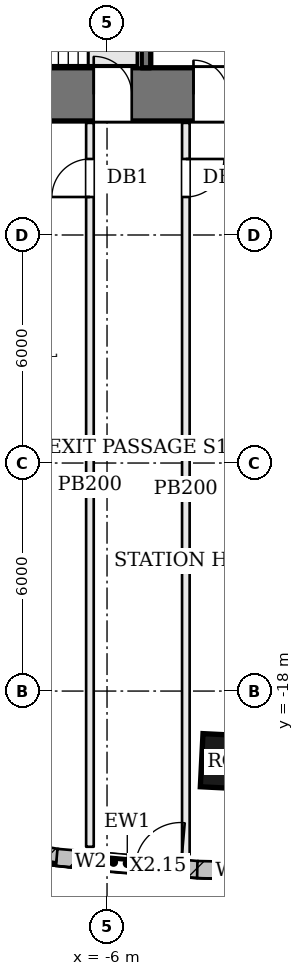
"""IFC4 building model, lengths in metres.
Left out: names, types, materials, properties, quantities, classifications, styles, units other than length and angle.
Written with IfcOpenShell. Run it as: python <this file> out.ifc"""

import sys

from ifc_helpers import new_model, si_unit, direction, frame, frame_2d, origin, origin_2d, place, context, subcontext, project, spatial, rectangle, extrude, element, fill, save


model = new_model("IFC4")
c1 = context("Model", 3, precision=1e-05, world=origin(), true_north=direction((0.0, 1.0)))
c2 = subcontext(c1, "Body", "Model", "MODEL_VIEW")
j1 = project(units=[si_unit("LENGTHUNIT", "METRE"), si_unit("PLANEANGLEUNIT", "RADIAN")], contexts=[c1])
p1 = place(None, origin())
s1 = spatial("IfcSite", under=j1, at=p1, CompositionType="ELEMENT")
p2 = place(p1, origin())
s2 = spatial("IfcBuilding", under=s1, at=p2, CompositionType="ELEMENT")
p3 = place(p2, origin())
s3 = spatial("IfcBuildingStorey", under=s2, at=p3, CompositionType="ELEMENT", Elevation=0.0)
p4 = place(p3, frame((-13.0, -2.3, 0.0), z_axis=(0.0, 0.0, 1.0), x_axis=(1.0, 0.0, 0.0)))
e1 = element("IfcWall", 1, at=p4, inside=s3, PredefinedType="SHEAR", context=c2, shape_type="SweptSolid", body=[
    extrude(rectangle(XDim=26.0, YDim=1.4, at=frame_2d((13.0, 0.0))), origin(), (0.0, 0.0, 1.0), 7.2),
])
p5 = place(p4, frame((9.275, 0.0, 0.0)))
e2 = element("IfcOpeningElement", 2, at=p5, cuts=e1, PredefinedType="OPENING", context=c2, shape_type="SweptSolid", body=[
    extrude(rectangle(XDim=0.9, YDim=2.1, at=frame_2d((0.45, 1.05))), frame((0.0, 0.71, 0.0), z_axis=(0.0, -1.0, 0.0), x_axis=(1.0, 0.0, 0.0)), (0.0, 0.0, 1.0), 1.42),
])
p6 = place(p4, frame((12.525, 0.0, 0.0)))
e3 = element("IfcOpeningElement", 3, at=p6, cuts=e1, PredefinedType="OPENING", context=c2, shape_type="SweptSolid", body=[
    extrude(rectangle(XDim=0.9, YDim=2.1, at=frame_2d((0.45, 1.05))), frame((0.0, 0.71, 0.0), z_axis=(0.0, -1.0, 0.0), x_axis=(1.0, 0.0, 0.0)), (0.0, 0.0, 1.0), 1.42),
])
p7 = place(p4, frame((15.0, 0.0, 0.0)))
e4 = element("IfcOpeningElement", 4, at=p7, cuts=e1, PredefinedType="OPENING", context=c2, shape_type="SweptSolid", body=[
    extrude(rectangle(XDim=1.0, YDim=2.1, at=frame_2d((0.5, 1.05))), frame((0.0, 0.71, 0.0), z_axis=(0.0, -1.0, 0.0), x_axis=(1.0, 0.0, 0.0)), (0.0, 0.0, 1.0), 1.42),
])
p8 = place(p4, frame((16.7, 0.0, 0.0)))
e5 = element("IfcOpeningElement", 5, at=p8, cuts=e1, PredefinedType="OPENING", context=c2, shape_type="SweptSolid", body=[
    extrude(rectangle(XDim=0.9, YDim=2.1, at=frame_2d((0.45, 1.05))), frame((0.0, 0.71, 0.0), z_axis=(0.0, -1.0, 0.0), x_axis=(1.0, 0.0, 0.0)), (0.0, 0.0, 1.0), 1.42),
])
p9 = place(p4, frame((6.65, 0.0, 0.0)))
e6 = element("IfcOpeningElement", 6, at=p9, cuts=e1, PredefinedType="OPENING", context=c2, shape_type="SweptSolid", body=[
    extrude(rectangle(XDim=1.0, YDim=2.1, at=frame_2d((0.5, 1.05))), frame((0.0, 0.71, 0.0), z_axis=(0.0, -1.0, 0.0), x_axis=(1.0, 0.0, 0.0)), (0.0, 0.0, 1.0), 1.42),
])
p10 = place(p4, frame((18.35, 0.0, 0.0)))
e7 = element("IfcOpeningElement", 7, at=p10, cuts=e1, PredefinedType="OPENING", context=c2, shape_type="SweptSolid", body=[
    extrude(rectangle(XDim=1.0, YDim=2.1, at=frame_2d((0.5, 1.05))), frame((0.0, 0.71, 0.0), z_axis=(0.0, -1.0, 0.0), x_axis=(1.0, 0.0, 0.0)), (0.0, 0.0, 1.0), 1.42),
])
p11 = place(p3, frame((-2.811, -19.854, 0.0), z_axis=(0.0, 0.0, 1.0), x_axis=(0.99874501614, -0.050083857035, 0.0)))
e8 = element("IfcColumn", 8, at=p11, inside=s3, PredefinedType="COLUMN", context=c2, shape_type="SweptSolid", body=[
    extrude(rectangle(XDim=1.4, YDim=1.4, at=origin_2d()), origin(), (0.0, 0.0, 1.0), 7.2),
])
p12 = place(p3, frame((-11.134, -21.706, 0.0), z_axis=(0.0, 0.0, 1.0), x_axis=(0.984947461591, -0.172853978566, 0.0)))
e9 = element("IfcWall", 9, at=p12, inside=s3, PredefinedType="SOLIDWALL", context=c2, shape_type="SweptSolid", body=[
    extrude(rectangle(XDim=3.888, YDim=0.45, at=frame_2d((1.944, 0.0))), origin(), (0.0, 0.0, 1.0), 3.55),
])
p13 = place(p12, frame((0.744, 0.0, 0.0)))
e10 = element("IfcOpeningElement", 10, at=p13, cuts=e9, PredefinedType="OPENING", context=c2, shape_type="SweptSolid", body=[
    extrude(rectangle(XDim=2.4, YDim=3.2, at=frame_2d((1.2, 1.6))), frame((0.0, 0.235, 0.0), z_axis=(0.0, -1.0, 0.0), x_axis=(1.0, 0.0, 0.0)), (0.0, 0.0, 1.0), 0.47),
])
p14 = place(p3, frame((-7.323, -22.376, 0.0), z_axis=(0.0, 0.0, 1.0), x_axis=(0.996259982326, -0.086406293838, 0.0)))
e11 = element("IfcWall", 11, at=p14, inside=s3, PredefinedType="SOLIDWALL", context=c2, shape_type="SweptSolid", body=[
    extrude(rectangle(XDim=3.727, YDim=0.45, at=frame_2d((1.863, 0.0))), origin(), (0.0, 0.0, 1.0), 6.95),
])
p15 = place(p14, frame((0.45, 0.0, 0.9)))
e12 = element("IfcOpeningElement", 12, at=p15, cuts=e11, PredefinedType="OPENING", context=c2, shape_type="SweptSolid", body=[
    extrude(rectangle(XDim=2.1, YDim=5.0, at=frame_2d((1.05, 2.5))), frame((0.0, 0.235, 0.0), z_axis=(0.0, -1.0, 0.0), x_axis=(1.0, 0.0, 0.0)), (0.0, 0.0, 1.0), 0.47),
])
p16 = place(p14, frame((2.077, 0.0, 0.0)))
e13 = element("IfcOpeningElement", 13, at=p16, cuts=e11, PredefinedType="OPENING", context=c2, shape_type="SweptSolid", body=[
    extrude(rectangle(XDim=1.2, YDim=2.4, at=frame_2d((0.6, 1.2))), frame((0.0, 0.235, 0.0), z_axis=(0.0, -1.0, 0.0), x_axis=(1.0, 0.0, 0.0)), (0.0, 0.0, 1.0), 0.47),
])
p17 = place(p3, frame((-3.625, -22.697, 0.0), z_axis=(0.0, 0.0, 1.0), x_axis=(0.999769941673, -0.0214490962, 0.0)))
e14 = element("IfcWall", 14, at=p17, inside=s3, PredefinedType="SOLIDWALL", context=c2, shape_type="SweptSolid", body=[
    extrude(rectangle(XDim=3.631, YDim=0.45, at=frame_2d((1.815, 0.0))), origin(), (0.0, 0.0, 1.0), 6.95),
])
p18 = place(p17, frame((0.45, 0.0, 0.9)))
e15 = element("IfcOpeningElement", 15, at=p18, cuts=e14, PredefinedType="OPENING", context=c2, shape_type="SweptSolid", body=[
    extrude(rectangle(XDim=2.1, YDim=5.0, at=frame_2d((1.05, 2.5))), frame((0.0, 0.235, 0.0), z_axis=(0.0, -1.0, 0.0), x_axis=(1.0, 0.0, 0.0)), (0.0, 0.0, 1.0), 0.47),
])
p19 = place(p17, frame((1.681, 0.0, 0.0)))
e16 = element("IfcOpeningElement", 16, at=p19, cuts=e14, PredefinedType="OPENING", context=c2, shape_type="SweptSolid", body=[
    extrude(rectangle(XDim=1.5, YDim=2.4, at=frame_2d((0.75, 1.2))), frame((0.0, 0.235, 0.0), z_axis=(0.0, -1.0, 0.0), x_axis=(1.0, 0.0, 0.0)), (0.0, 0.0, 1.0), 0.47),
])
p20 = place(p3, frame((-4.975, -1.6, 0.0), z_axis=(0.0, 0.0, 1.0), x_axis=(0.0, 1.0, 0.0)))
e17 = element("IfcWall", 17, at=p20, inside=s3, PredefinedType="SOLIDWALL", context=c2, shape_type="SweptSolid", body=[
    extrude(rectangle(XDim=12.2, YDim=0.25, at=frame_2d((6.1, 0.0))), origin(), (0.0, 0.0, 1.0), 6.95),
])
p21 = place(p20, frame((4.65, 0.0, 0.0)))
e18 = element("IfcOpeningElement", 18, at=p21, cuts=e17, PredefinedType="OPENING", context=c2, shape_type="SweptSolid", body=[
    extrude(rectangle(XDim=1.2, YDim=2.1, at=frame_2d((0.6, 1.05))), frame((0.0, 0.135, 0.0), z_axis=(0.0, -1.0, 0.0), x_axis=(1.0, 0.0, 0.0)), (0.0, 0.0, 1.0), 0.27),
])
p22 = place(p3, frame((-3.926, -3.05, 0.0), z_axis=(0.0, 0.0, 1.0), x_axis=(0.0, -1.0, 0.0)))
e19 = element("IfcWall", 19, at=p22, inside=s3, PredefinedType="PARTITIONING", context=c2, shape_type="SweptSolid", body=[
    extrude(rectangle(XDim=19.252, YDim=0.2, at=frame_2d((9.626, 0.0))), origin(), (0.0, 0.0, 1.0), 6.23),
])
p23 = place(p22, frame((0.95, 0.0, 0.0)))
e20 = element("IfcOpeningElement", 20, at=p23, cuts=e19, PredefinedType="OPENING", context=c2, shape_type="SweptSolid", body=[
    extrude(rectangle(XDim=1.0, YDim=2.1, at=frame_2d((0.5, 1.05))), frame((0.0, 0.11, 0.0), z_axis=(0.0, -1.0, 0.0), x_axis=(1.0, 0.0, 0.0)), (0.0, 0.0, 1.0), 0.22),
])
p24 = place(p3, frame((-6.45, -22.097, 0.0), z_axis=(0.0, 0.0, 1.0), x_axis=(0.0, 1.0, 0.0)))
e21 = element("IfcWall", 21, at=p24, inside=s3, PredefinedType="PARTITIONING", context=c2, shape_type="SweptSolid", body=[
    extrude(rectangle(XDim=19.047, YDim=0.2, at=frame_2d((9.523, 0.0))), origin(), (0.0, 0.0, 1.0), 6.23),
])
p25 = place(p24, frame((17.097, 0.0, 0.0)))
e22 = element("IfcOpeningElement", 22, at=p25, cuts=e21, PredefinedType="OPENING", context=c2, shape_type="SweptSolid", body=[
    extrude(rectangle(XDim=1.0, YDim=2.1, at=frame_2d((0.5, 1.05))), frame((0.0, 0.11, 0.0), z_axis=(0.0, -1.0, 0.0), x_axis=(1.0, 0.0, 0.0)), (0.0, 0.0, 1.0), 0.22),
])
p26 = place(p15, origin())
e23 = element("IfcWindow", 23, at=p26, inside=s3, PartitioningType="SINGLE_PANEL", PredefinedType="WINDOW", context=c2, shape_type="SweptSolid", body=[
    extrude(rectangle(XDim=2.1, YDim=5.0, at=frame_2d((1.05, 2.5))), frame((0.0, 0.135, 0.0), z_axis=(0.0, -1.0, 0.0), x_axis=(1.0, 0.0, 0.0)), (0.0, 0.0, 1.0), 0.06),
])
fill(e12, e23)
p27 = place(p16, frame((1.2, 0.0, 0.0), z_axis=(0.0, 0.0, 1.0), x_axis=(-1.0, 0.0, 0.0)))
e24 = element("IfcDoor", 24, at=p27, inside=s3, OperationType="SINGLE_SWING_RIGHT", PredefinedType="DOOR", context=c2, shape_type="SweptSolid", body=[
    extrude(rectangle(XDim=1.2, YDim=2.4, at=frame_2d((0.6, 1.2))), frame((0.0, 0.025, 0.0), z_axis=(0.0, -1.0, 0.0), x_axis=(1.0, 0.0, 0.0)), (0.0, 0.0, 1.0), 0.05),
])
fill(e13, e24)
p28 = place(p18, origin())
e25 = element("IfcWindow", 25, at=p28, inside=s3, PartitioningType="SINGLE_PANEL", PredefinedType="WINDOW", context=c2, shape_type="SweptSolid", body=[
    extrude(rectangle(XDim=2.1, YDim=5.0, at=frame_2d((1.05, 2.5))), frame((0.0, 0.135, 0.0), z_axis=(0.0, -1.0, 0.0), x_axis=(1.0, 0.0, 0.0)), (0.0, 0.0, 1.0), 0.06),
])
fill(e15, e25)
p29 = place(p5, origin())
e26 = element("IfcDoor", 26, at=p29, inside=s3, OperationType="SINGLE_SWING_LEFT", PredefinedType="DOOR", context=c2, shape_type="SweptSolid", body=[
    extrude(rectangle(XDim=0.9, YDim=2.1, at=frame_2d((0.45, 1.05))), frame((0.0, 0.025, 0.0), z_axis=(0.0, -1.0, 0.0), x_axis=(1.0, 0.0, 0.0)), (0.0, 0.0, 1.0), 0.05),
])
fill(e2, e26)
p30 = place(p9, origin())
e27 = element("IfcDoor", 27, at=p30, inside=s3, OperationType="SINGLE_SWING_LEFT", PredefinedType="DOOR", context=c2, shape_type="SweptSolid", body=[
    extrude(rectangle(XDim=1.0, YDim=2.1, at=frame_2d((0.5, 1.05))), frame((0.0, 0.025, 0.0), z_axis=(0.0, -1.0, 0.0), x_axis=(1.0, 0.0, 0.0)), (0.0, 0.0, 1.0), 0.05),
])
fill(e6, e27)
p31 = place(p23, origin())
e28 = element("IfcDoor", 28, at=p31, inside=s3, OperationType="SINGLE_SWING_LEFT", PredefinedType="DOOR", context=c2, shape_type="SweptSolid", body=[
    extrude(rectangle(XDim=1.0, YDim=2.1, at=frame_2d((0.5, 1.05))), frame((0.0, 0.025, 0.0), z_axis=(0.0, -1.0, 0.0), x_axis=(1.0, 0.0, 0.0)), (0.0, 0.0, 1.0), 0.05),
])
fill(e20, e28)
p32 = place(p25, origin())
e29 = element("IfcDoor", 29, at=p32, inside=s3, OperationType="SINGLE_SWING_LEFT", PredefinedType="DOOR", context=c2, shape_type="SweptSolid", body=[
    extrude(rectangle(XDim=1.0, YDim=2.1, at=frame_2d((0.5, 1.05))), frame((0.0, 0.025, 0.0), z_axis=(0.0, -1.0, 0.0), x_axis=(1.0, 0.0, 0.0)), (0.0, 0.0, 1.0), 0.05),
])
fill(e22, e29)
save(model, sys.argv[1])
